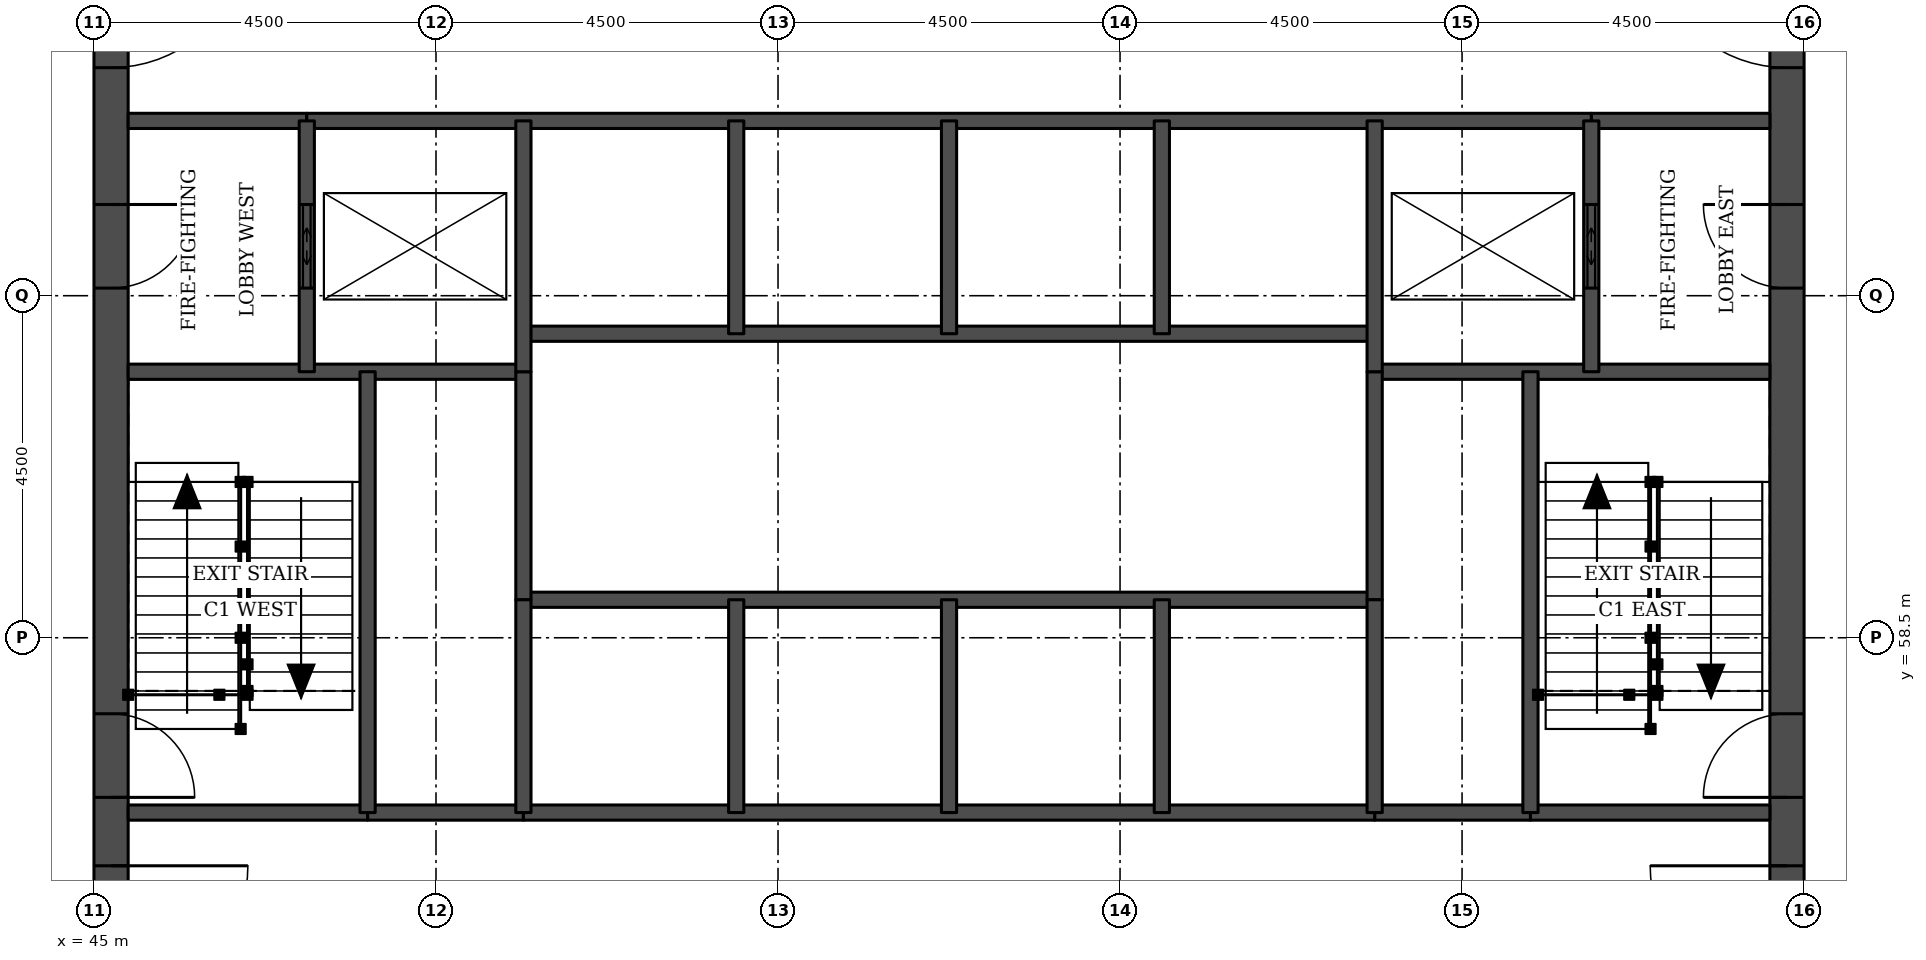
"""IFC4 building model, lengths in metres.
Left out: names, types, materials, properties, quantities, classifications, styles, units other than length and angle.
Written with IfcOpenShell. Run it as: python <this file> out.ifc"""

import sys

from ifc_helpers import new_model, si_unit, direction, frame, frame_2d, origin, place, context, subcontext, project, spatial, rectangle, extrude, element, fill, save


model = new_model("IFC4")
c1 = context("Model", 3, precision=1e-05, world=origin(), true_north=direction((0.0, 1.0)))
c2 = subcontext(c1, "Body", "Model", "MODEL_VIEW")
j1 = project(units=[si_unit("LENGTHUNIT", "METRE"), si_unit("PLANEANGLEUNIT", "RADIAN")], contexts=[c1])
p1 = place(None, origin())
s1 = spatial("IfcSite", under=j1, at=p1, CompositionType="ELEMENT")
p2 = place(p1, origin())
s2 = spatial("IfcBuilding", under=s1, at=p2, CompositionType="ELEMENT")
p3 = place(p2, frame((0.0, 0.0, 108.5)))
s3 = spatial("IfcBuildingStorey", under=s2, at=p3, CompositionType="ELEMENT", Elevation=108.5)
p4 = place(p3, frame((45.225, 49.5, 0.0), z_axis=(0.0, 0.0, 1.0), x_axis=(0.0, 1.0, 0.0)))
e1 = element("IfcWall", 1, at=p4, inside=s3, PredefinedType="SHEAR", context=c2, shape_type="SweptSolid", body=[
    extrude(rectangle(XDim=22.5, YDim=0.45, at=frame_2d((11.25, 0.0))), origin(), (0.0, 0.0, 1.0), 3.7),
])
p5 = place(p4, frame((4.2, 0.0, 0.0)))
e2 = element("IfcOpeningElement", 2, at=p5, cuts=e1, PredefinedType="OPENING", context=c2, shape_type="SweptSolid", body=[
    extrude(rectangle(XDim=1.8, YDim=2.1, at=frame_2d((0.9, 1.05))), frame((0.0, 0.235, 0.0), z_axis=(0.0, -1.0, 0.0), x_axis=(1.0, 0.0, 0.0)), (0.0, 0.0, 1.0), 0.47),
])
p6 = place(p4, frame((6.9, 0.0, 0.0)))
e3 = element("IfcOpeningElement", 3, at=p6, cuts=e1, PredefinedType="OPENING", context=c2, shape_type="SweptSolid", body=[
    extrude(rectangle(XDim=1.1, YDim=2.1, at=frame_2d((0.55, 1.05))), frame((0.0, 0.235, 0.0), z_axis=(0.0, -1.0, 0.0), x_axis=(1.0, 0.0, 0.0)), (0.0, 0.0, 1.0), 0.47),
])
p7 = place(p4, frame((13.6, 0.0, 0.0)))
e4 = element("IfcOpeningElement", 4, at=p7, cuts=e1, PredefinedType="OPENING", context=c2, shape_type="SweptSolid", body=[
    extrude(rectangle(XDim=1.1, YDim=2.1, at=frame_2d((0.55, 1.05))), frame((0.0, 0.235, 0.0), z_axis=(0.0, -1.0, 0.0), x_axis=(1.0, 0.0, 0.0)), (0.0, 0.0, 1.0), 0.47),
])
p8 = place(p4, frame((16.5, 0.0, 0.0)))
e5 = element("IfcOpeningElement", 5, at=p8, cuts=e1, PredefinedType="OPENING", context=c2, shape_type="SweptSolid", body=[
    extrude(rectangle(XDim=1.8, YDim=2.1, at=frame_2d((0.9, 1.05))), frame((0.0, 0.235, 0.0), z_axis=(0.0, -1.0, 0.0), x_axis=(1.0, 0.0, 0.0)), (0.0, 0.0, 1.0), 0.47),
])
p9 = place(p3, frame((67.275, 49.5, 0.0), z_axis=(0.0, 0.0, 1.0), x_axis=(0.0, 1.0, 0.0)))
e6 = element("IfcWall", 6, at=p9, inside=s3, PredefinedType="SHEAR", context=c2, shape_type="SweptSolid", body=[
    extrude(rectangle(XDim=22.5, YDim=0.45, at=frame_2d((11.25, 0.0))), origin(), (0.0, 0.0, 1.0), 3.7),
])
p10 = place(p9, frame((4.2, 0.0, 0.0)))
e7 = element("IfcOpeningElement", 7, at=p10, cuts=e6, PredefinedType="OPENING", context=c2, shape_type="SweptSolid", body=[
    extrude(rectangle(XDim=1.8, YDim=2.1, at=frame_2d((0.9, 1.05))), frame((0.0, 0.235, 0.0), z_axis=(0.0, -1.0, 0.0), x_axis=(1.0, 0.0, 0.0)), (0.0, 0.0, 1.0), 0.47),
])
p11 = place(p9, frame((6.9, 0.0, 0.0)))
e8 = element("IfcOpeningElement", 8, at=p11, cuts=e6, PredefinedType="OPENING", context=c2, shape_type="SweptSolid", body=[
    extrude(rectangle(XDim=1.1, YDim=2.1, at=frame_2d((0.55, 1.05))), frame((0.0, 0.235, 0.0), z_axis=(0.0, -1.0, 0.0), x_axis=(1.0, 0.0, 0.0)), (0.0, 0.0, 1.0), 0.47),
])
p12 = place(p9, frame((13.6, 0.0, 0.0)))
e9 = element("IfcOpeningElement", 9, at=p12, cuts=e6, PredefinedType="OPENING", context=c2, shape_type="SweptSolid", body=[
    extrude(rectangle(XDim=1.1, YDim=2.1, at=frame_2d((0.55, 1.05))), frame((0.0, 0.235, 0.0), z_axis=(0.0, -1.0, 0.0), x_axis=(1.0, 0.0, 0.0)), (0.0, 0.0, 1.0), 0.47),
])
p13 = place(p9, frame((16.5, 0.0, 0.0)))
e10 = element("IfcOpeningElement", 10, at=p13, cuts=e6, PredefinedType="OPENING", context=c2, shape_type="SweptSolid", body=[
    extrude(rectangle(XDim=1.8, YDim=2.1, at=frame_2d((0.9, 1.05))), frame((0.0, 0.235, 0.0), z_axis=(0.0, -1.0, 0.0), x_axis=(1.0, 0.0, 0.0)), (0.0, 0.0, 1.0), 0.47),
])
for number, where, z_axis, x_axis in (
    (11, (48.6, 56.2, 0.0), (0.0, 0.0, 1.0), (1.0, 0.0, 0.0)),
    (12, (61.85, 56.2, 0.0), (0.0, 0.0, 1.0), (1.0, 0.0, 0.0)),
):
    element("IfcWall", number, at=place(p3, frame(where, z_axis=z_axis, x_axis=x_axis)), inside=s3, PredefinedType="SOLIDWALL", context=c2, shape_type="SweptSolid", body=[
        extrude(rectangle(XDim=2.05, YDim=0.2, at=frame_2d((1.025, 0.0))), origin(), (0.0, 0.0, 1.0), 3.55),
    ])
p14 = place(p3, frame((45.45, 56.2, 0.0), z_axis=(0.0, 0.0, 1.0), x_axis=(1.0, 0.0, 0.0)))
e13 = element("IfcWall", 13, at=p14, inside=s3, PredefinedType="SOLIDWALL", context=c2, shape_type="SweptSolid", body=[
    extrude(rectangle(XDim=3.15, YDim=0.2, at=frame_2d((1.575, 0.0))), origin(), (0.0, 0.0, 1.0), 3.55),
])
p15 = place(p3, frame((50.65, 56.2, 0.0), z_axis=(0.0, 0.0, 1.0), x_axis=(1.0, 0.0, 0.0)))
e14 = element("IfcWall", 14, at=p15, inside=s3, PredefinedType="SOLIDWALL", context=c2, shape_type="SweptSolid", body=[
    extrude(rectangle(XDim=11.2, YDim=0.2, at=frame_2d((5.6, 0.0))), origin(), (0.0, 0.0, 1.0), 3.55),
])
p16 = place(p3, frame((63.9, 56.2, 0.0), z_axis=(0.0, 0.0, 1.0), x_axis=(1.0, 0.0, 0.0)))
e15 = element("IfcWall", 15, at=p16, inside=s3, PredefinedType="SOLIDWALL", context=c2, shape_type="SweptSolid", body=[
    extrude(rectangle(XDim=3.15, YDim=0.2, at=frame_2d((1.575, 0.0))), origin(), (0.0, 0.0, 1.0), 3.55),
])
p17 = place(p3, frame((50.65, 59.0, 0.0), z_axis=(0.0, 0.0, 1.0), x_axis=(1.0, 0.0, 0.0)))
e16 = element("IfcWall", 16, at=p17, inside=s3, PredefinedType="SOLIDWALL", context=c2, shape_type="SweptSolid", body=[
    extrude(rectangle(XDim=11.2, YDim=0.2, at=frame_2d((5.6, 0.0))), origin(), (0.0, 0.0, 1.0), 3.7),
])
for number, where, z_axis, x_axis in (
    (17, (45.45, 62.0, 0.0), (0.0, 0.0, 1.0), (1.0, 0.0, 0.0)),
    (18, (61.85, 62.0, 0.0), (0.0, 0.0, 1.0), (1.0, 0.0, 0.0)),
):
    element("IfcWall", number, at=place(p3, frame(where, z_axis=z_axis, x_axis=x_axis)), inside=s3, PredefinedType="SOLIDWALL", context=c2, shape_type="SweptSolid", body=[
        extrude(rectangle(XDim=5.2, YDim=0.2, at=frame_2d((2.6, 0.0))), origin(), (0.0, 0.0, 1.0), 3.55),
    ])
p18 = place(p3, frame((50.65, 62.5, 0.0), z_axis=(0.0, 0.0, 1.0), x_axis=(1.0, 0.0, 0.0)))
e19 = element("IfcWall", 19, at=p18, inside=s3, PredefinedType="SOLIDWALL", context=c2, shape_type="SweptSolid", body=[
    extrude(rectangle(XDim=11.2, YDim=0.2, at=frame_2d((5.6, 0.0))), origin(), (0.0, 0.0, 1.0), 3.7),
])
for number, where, z_axis, x_axis in (
    (20, (45.45, 65.3, 0.0), (0.0, 0.0, 1.0), (1.0, 0.0, 0.0)),
    (21, (64.7, 65.3, 0.0), (0.0, 0.0, 1.0), (1.0, 0.0, 0.0)),
):
    element("IfcWall", number, at=place(p3, frame(where, z_axis=z_axis, x_axis=x_axis)), inside=s3, PredefinedType="SOLIDWALL", context=c2, shape_type="SweptSolid", body=[
        extrude(rectangle(XDim=2.35, YDim=0.2, at=frame_2d((1.175, 0.0))), origin(), (0.0, 0.0, 1.0), 3.55),
    ])
p19 = place(p3, frame((47.8, 65.3, 0.0), z_axis=(0.0, 0.0, 1.0), x_axis=(1.0, 0.0, 0.0)))
e22 = element("IfcWall", 22, at=p19, inside=s3, PredefinedType="SOLIDWALL", context=c2, shape_type="SweptSolid", body=[
    extrude(rectangle(XDim=16.9, YDim=0.2, at=frame_2d((8.45, 0.0))), origin(), (0.0, 0.0, 1.0), 3.55),
])
p20 = place(p3, frame((47.8, 62.0, 0.0), z_axis=(0.0, 0.0, 1.0), x_axis=(0.0, 1.0, 0.0)))
e23 = element("IfcWall", 23, at=p20, inside=s3, PredefinedType="SOLIDWALL", context=c2, shape_type="SweptSolid", body=[
    extrude(rectangle(XDim=3.3, YDim=0.2, at=frame_2d((1.65, 0.0))), origin(), (0.0, 0.0, 1.0), 3.55),
])
p21 = place(p20, frame((1.1, 0.0, 0.0)))
e24 = element("IfcOpeningElement", 24, at=p21, cuts=e23, PredefinedType="OPENING", context=c2, shape_type="SweptSolid", body=[
    extrude(rectangle(XDim=1.1, YDim=2.1, at=frame_2d((0.55, 1.05))), frame((0.0, 0.11, 0.0), z_axis=(0.0, -1.0, 0.0), x_axis=(1.0, 0.0, 0.0)), (0.0, 0.0, 1.0), 0.22),
])
p22 = place(p3, frame((48.6, 56.2, 0.0), z_axis=(0.0, 0.0, 1.0), x_axis=(0.0, 1.0, 0.0)))
e25 = element("IfcWall", 25, at=p22, inside=s3, PredefinedType="SOLIDWALL", context=c2, shape_type="SweptSolid", body=[
    extrude(rectangle(XDim=5.8, YDim=0.2, at=frame_2d((2.9, 0.0))), origin(), (0.0, 0.0, 1.0), 3.55),
])
p23 = place(p3, frame((50.65, 59.0, 0.0), z_axis=(0.0, 0.0, 1.0), x_axis=(0.0, 1.0, 0.0)))
e26 = element("IfcWall", 26, at=p23, inside=s3, PredefinedType="SOLIDWALL", context=c2, shape_type="SweptSolid", body=[
    extrude(rectangle(XDim=3.0, YDim=0.2, at=frame_2d((1.5, 0.0))), origin(), (0.0, 0.0, 1.0), 3.7),
])
p24 = place(p3, frame((50.65, 56.2, 0.0), z_axis=(0.0, 0.0, 1.0), x_axis=(0.0, 1.0, 0.0)))
e27 = element("IfcWall", 27, at=p24, inside=s3, PredefinedType="SOLIDWALL", context=c2, shape_type="SweptSolid", body=[
    extrude(rectangle(XDim=2.8, YDim=0.2, at=frame_2d((1.4, 0.0))), origin(), (0.0, 0.0, 1.0), 3.55),
])
p25 = place(p3, frame((50.65, 62.0, 0.0), z_axis=(0.0, 0.0, 1.0), x_axis=(0.0, 1.0, 0.0)))
e28 = element("IfcWall", 28, at=p25, inside=s3, PredefinedType="SOLIDWALL", context=c2, shape_type="SweptSolid", body=[
    extrude(rectangle(XDim=3.3, YDim=0.2, at=frame_2d((1.65, 0.0))), origin(), (0.0, 0.0, 1.0), 3.55),
])
for number, where, z_axis, x_axis in (
    (29, (53.45, 56.2, 0.0), (0.0, 0.0, 1.0), (0.0, 1.0, 0.0)),
    (30, (53.45, 62.5, 0.0), (0.0, 0.0, 1.0), (0.0, 1.0, 0.0)),
    (31, (56.25, 56.2, 0.0), (0.0, 0.0, 1.0), (0.0, 1.0, 0.0)),
    (32, (56.25, 62.5, 0.0), (0.0, 0.0, 1.0), (0.0, 1.0, 0.0)),
    (33, (59.05, 56.2, 0.0), (0.0, 0.0, 1.0), (0.0, 1.0, 0.0)),
    (34, (59.05, 62.5, 0.0), (0.0, 0.0, 1.0), (0.0, 1.0, 0.0)),
):
    element("IfcWall", number, at=place(p3, frame(where, z_axis=z_axis, x_axis=x_axis)), inside=s3, PredefinedType="SOLIDWALL", context=c2, shape_type="SweptSolid", body=[
        extrude(rectangle(XDim=2.8, YDim=0.2, at=frame_2d((1.4, 0.0))), origin(), (0.0, 0.0, 1.0), 3.55),
    ])
p26 = place(p3, frame((61.85, 59.0, 0.0), z_axis=(0.0, 0.0, 1.0), x_axis=(0.0, 1.0, 0.0)))
e35 = element("IfcWall", 35, at=p26, inside=s3, PredefinedType="SOLIDWALL", context=c2, shape_type="SweptSolid", body=[
    extrude(rectangle(XDim=3.0, YDim=0.2, at=frame_2d((1.5, 0.0))), origin(), (0.0, 0.0, 1.0), 3.7),
])
p27 = place(p3, frame((61.85, 56.2, 0.0), z_axis=(0.0, 0.0, 1.0), x_axis=(0.0, 1.0, 0.0)))
e36 = element("IfcWall", 36, at=p27, inside=s3, PredefinedType="SOLIDWALL", context=c2, shape_type="SweptSolid", body=[
    extrude(rectangle(XDim=2.8, YDim=0.2, at=frame_2d((1.4, 0.0))), origin(), (0.0, 0.0, 1.0), 3.55),
])
p28 = place(p3, frame((61.85, 62.0, 0.0), z_axis=(0.0, 0.0, 1.0), x_axis=(0.0, 1.0, 0.0)))
e37 = element("IfcWall", 37, at=p28, inside=s3, PredefinedType="SOLIDWALL", context=c2, shape_type="SweptSolid", body=[
    extrude(rectangle(XDim=3.3, YDim=0.2, at=frame_2d((1.65, 0.0))), origin(), (0.0, 0.0, 1.0), 3.55),
])
p29 = place(p3, frame((63.9, 56.2, 0.0), z_axis=(0.0, 0.0, 1.0), x_axis=(0.0, 1.0, 0.0)))
e38 = element("IfcWall", 38, at=p29, inside=s3, PredefinedType="SOLIDWALL", context=c2, shape_type="SweptSolid", body=[
    extrude(rectangle(XDim=5.8, YDim=0.2, at=frame_2d((2.9, 0.0))), origin(), (0.0, 0.0, 1.0), 3.55),
])
p30 = place(p3, frame((64.7, 62.0, 0.0), z_axis=(0.0, 0.0, 1.0), x_axis=(0.0, 1.0, 0.0)))
e39 = element("IfcWall", 39, at=p30, inside=s3, PredefinedType="SOLIDWALL", context=c2, shape_type="SweptSolid", body=[
    extrude(rectangle(XDim=3.3, YDim=0.2, at=frame_2d((1.65, 0.0))), origin(), (0.0, 0.0, 1.0), 3.55),
])
p31 = place(p30, frame((1.1, 0.0, 0.0)))
e40 = element("IfcOpeningElement", 40, at=p31, cuts=e39, PredefinedType="OPENING", context=c2, shape_type="SweptSolid", body=[
    extrude(rectangle(XDim=1.1, YDim=2.1, at=frame_2d((0.55, 1.05))), frame((0.0, 0.11, 0.0), z_axis=(0.0, -1.0, 0.0), x_axis=(1.0, 0.0, 0.0)), (0.0, 0.0, 1.0), 0.22),
])
p32 = place(p21, origin())
e41 = element("IfcDoor", 41, at=p32, inside=s3, OperationType="DOUBLE_DOOR_SLIDING", PredefinedType="DOOR", context=c2, shape_type="SweptSolid", body=[
    extrude(rectangle(XDim=1.1, YDim=2.1, at=frame_2d((0.55, 1.05))), frame((0.0, 0.025, 0.0), z_axis=(0.0, -1.0, 0.0), x_axis=(1.0, 0.0, 0.0)), (0.0, 0.0, 1.0), 0.05),
])
fill(e24, e41)
p33 = place(p31, origin())
e42 = element("IfcDoor", 42, at=p33, inside=s3, OperationType="DOUBLE_DOOR_SLIDING", PredefinedType="DOOR", context=c2, shape_type="SweptSolid", body=[
    extrude(rectangle(XDim=1.1, YDim=2.1, at=frame_2d((0.55, 1.05))), frame((0.0, 0.025, 0.0), z_axis=(0.0, -1.0, 0.0), x_axis=(1.0, 0.0, 0.0)), (0.0, 0.0, 1.0), 0.05),
])
fill(e40, e42)
p34 = place(p5, frame((1.8, 0.0, 0.0), z_axis=(0.0, 0.0, 1.0), x_axis=(-1.0, 0.0, 0.0)))
e43 = element("IfcDoor", 43, at=p34, inside=s3, OperationType="SINGLE_SWING_LEFT", PredefinedType="DOOR", context=c2, shape_type="SweptSolid", body=[
    extrude(rectangle(XDim=1.8, YDim=2.1, at=frame_2d((0.9, 1.05))), frame((0.0, 0.025, 0.0), z_axis=(0.0, -1.0, 0.0), x_axis=(1.0, 0.0, 0.0)), (0.0, 0.0, 1.0), 0.05),
])
fill(e2, e43)
p35 = place(p6, frame((1.1, 0.0, 0.0), z_axis=(0.0, 0.0, 1.0), x_axis=(-1.0, 0.0, 0.0)))
e44 = element("IfcDoor", 44, at=p35, inside=s3, OperationType="SINGLE_SWING_RIGHT", PredefinedType="DOOR", context=c2, shape_type="SweptSolid", body=[
    extrude(rectangle(XDim=1.1, YDim=2.1, at=frame_2d((0.55, 1.05))), frame((0.0, 0.025, 0.0), z_axis=(0.0, -1.0, 0.0), x_axis=(1.0, 0.0, 0.0)), (0.0, 0.0, 1.0), 0.05),
])
fill(e3, e44)
p36 = place(p7, frame((1.1, 0.0, 0.0), z_axis=(0.0, 0.0, 1.0), x_axis=(-1.0, 0.0, 0.0)))
e45 = element("IfcDoor", 45, at=p36, inside=s3, OperationType="SINGLE_SWING_LEFT", PredefinedType="DOOR", context=c2, shape_type="SweptSolid", body=[
    extrude(rectangle(XDim=1.1, YDim=2.1, at=frame_2d((0.55, 1.05))), frame((0.0, 0.025, 0.0), z_axis=(0.0, -1.0, 0.0), x_axis=(1.0, 0.0, 0.0)), (0.0, 0.0, 1.0), 0.05),
])
fill(e4, e45)
p37 = place(p8, frame((1.8, 0.0, 0.0), z_axis=(0.0, 0.0, 1.0), x_axis=(-1.0, 0.0, 0.0)))
e46 = element("IfcDoor", 46, at=p37, inside=s3, OperationType="SINGLE_SWING_LEFT", PredefinedType="DOOR", context=c2, shape_type="SweptSolid", body=[
    extrude(rectangle(XDim=1.8, YDim=2.1, at=frame_2d((0.9, 1.05))), frame((0.0, 0.025, 0.0), z_axis=(0.0, -1.0, 0.0), x_axis=(1.0, 0.0, 0.0)), (0.0, 0.0, 1.0), 0.05),
])
fill(e5, e46)
p38 = place(p10, origin())
e47 = element("IfcDoor", 47, at=p38, inside=s3, OperationType="SINGLE_SWING_RIGHT", PredefinedType="DOOR", context=c2, shape_type="SweptSolid", body=[
    extrude(rectangle(XDim=1.8, YDim=2.1, at=frame_2d((0.9, 1.05))), frame((0.0, 0.025, 0.0), z_axis=(0.0, -1.0, 0.0), x_axis=(1.0, 0.0, 0.0)), (0.0, 0.0, 1.0), 0.05),
])
fill(e7, e47)
p39 = place(p11, origin())
e48 = element("IfcDoor", 48, at=p39, inside=s3, OperationType="SINGLE_SWING_LEFT", PredefinedType="DOOR", context=c2, shape_type="SweptSolid", body=[
    extrude(rectangle(XDim=1.1, YDim=2.1, at=frame_2d((0.55, 1.05))), frame((0.0, 0.025, 0.0), z_axis=(0.0, -1.0, 0.0), x_axis=(1.0, 0.0, 0.0)), (0.0, 0.0, 1.0), 0.05),
])
fill(e8, e48)
p40 = place(p12, origin())
e49 = element("IfcDoor", 49, at=p40, inside=s3, OperationType="SINGLE_SWING_RIGHT", PredefinedType="DOOR", context=c2, shape_type="SweptSolid", body=[
    extrude(rectangle(XDim=1.1, YDim=2.1, at=frame_2d((0.55, 1.05))), frame((0.0, 0.025, 0.0), z_axis=(0.0, -1.0, 0.0), x_axis=(1.0, 0.0, 0.0)), (0.0, 0.0, 1.0), 0.05),
])
fill(e9, e49)
p41 = place(p13, origin())
e50 = element("IfcDoor", 50, at=p41, inside=s3, OperationType="SINGLE_SWING_RIGHT", PredefinedType="DOOR", context=c2, shape_type="SweptSolid", body=[
    extrude(rectangle(XDim=1.8, YDim=2.1, at=frame_2d((0.9, 1.05))), frame((0.0, 0.025, 0.0), z_axis=(0.0, -1.0, 0.0), x_axis=(1.0, 0.0, 0.0)), (0.0, 0.0, 1.0), 0.05),
])
fill(e10, e50)
save(model, sys.argv[1])
